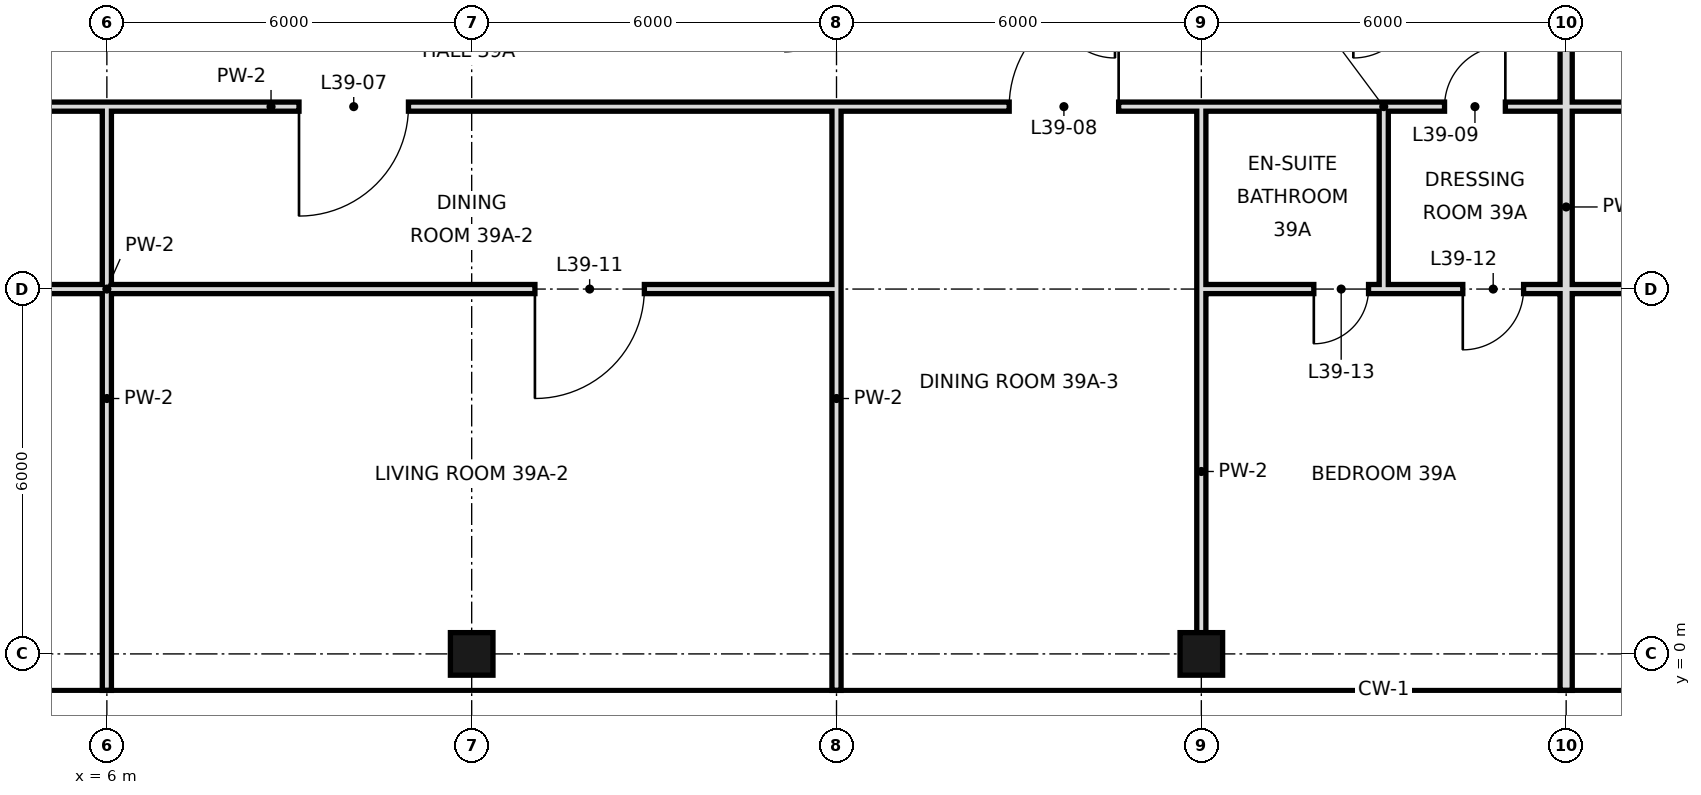
"""IFC4 building model, lengths in metres.
Left out: names, types, materials, properties, quantities, classifications, styles, units other than length and angle.
Written with IfcOpenShell. Run it as: python <this file> out.ifc"""

import sys

from ifc_helpers import new_model, si_unit, direction, frame, frame_2d, origin, origin_2d, place, context, subcontext, project, spatial, rectangle, hollow_rectangle, extrude, element, fill, save


model = new_model("IFC4")
c1 = context("Model", 3, precision=1e-05, world=origin(), true_north=direction((0.0, 1.0)))
c2 = subcontext(c1, "Body", "Model", "MODEL_VIEW")
j1 = project(units=[si_unit("LENGTHUNIT", "METRE"), si_unit("PLANEANGLEUNIT", "RADIAN")], contexts=[c1])
p1 = place(None, origin())
s1 = spatial("IfcSite", under=j1, at=p1, CompositionType="ELEMENT")
p2 = place(p1, origin())
s2 = spatial("IfcBuilding", under=s1, at=p2, CompositionType="ELEMENT")
p3 = place(p2, frame((0.0, 0.0, 170.8)))
s3 = spatial("IfcBuildingStorey", under=s2, at=p3, CompositionType="ELEMENT", Elevation=170.8)
for number, where, z_axis, x_axis in (
    (1, (12.0, 0.0, 0.0), (0.0, 0.0, 1.0), (1.0, 0.0, 0.0)),
    (2, (24.0, 0.0, 0.0), (0.0, 0.0, 1.0), (1.0, 0.0, 0.0)),
):
    element("IfcColumn", number, at=place(p3, frame(where, z_axis=z_axis, x_axis=x_axis)), inside=s3, PredefinedType="COLUMN", context=c2, shape_type="SweptSolid", body=[
        extrude(hollow_rectangle(XDim=0.7, YDim=0.7, WallThickness=0.036, at=origin_2d()), origin(), (0.0, 0.0, 1.0), 3.6),
    ])
p4 = place(p3, frame((18.0, -0.6, 0.0), z_axis=(0.0, 0.0, 1.0), x_axis=(0.0, 1.0, 0.0)))
e3 = element("IfcWall", 3, at=p4, inside=s3, PredefinedType="PARTITIONING", context=c2, shape_type="SweptSolid", body=[
    extrude(rectangle(XDim=9.6, YDim=0.15, at=frame_2d((4.8, 0.0))), origin(), (0.0, 0.0, 1.0), 2.72),
])
p5 = place(p3, frame((24.0, 0.0, 0.0), z_axis=(0.0, 0.0, 1.0), x_axis=(0.0, 1.0, 0.0)))
e4 = element("IfcWall", 4, at=p5, inside=s3, PredefinedType="PARTITIONING", context=c2, shape_type="SweptSolid", body=[
    extrude(rectangle(XDim=6.0, YDim=0.15, at=frame_2d((3.0, 0.0))), origin(), (0.0, 0.0, 1.0), 2.72),
])
p6 = place(p3, frame((24.0, 6.0, 0.0), z_axis=(0.0, 0.0, 1.0), x_axis=(0.0, 1.0, 0.0)))
e5 = element("IfcWall", 5, at=p6, inside=s3, PredefinedType="PARTITIONING", context=c2, shape_type="SweptSolid", body=[
    extrude(rectangle(XDim=3.0, YDim=0.15, at=frame_2d((1.5, 0.0))), origin(), (0.0, 0.0, 1.0), 2.72),
])
p7 = place(p3, frame((27.0, 6.0, 0.0), z_axis=(0.0, 0.0, 1.0), x_axis=(0.0, 1.0, 0.0)))
e6 = element("IfcWall", 6, at=p7, inside=s3, PredefinedType="PARTITIONING", context=c2, shape_type="SweptSolid", body=[
    extrude(rectangle(XDim=3.0, YDim=0.15, at=frame_2d((1.5, 0.0))), origin(), (0.0, 0.0, 1.0), 3.42),
])
p8 = place(p3, frame((30.0, -0.6, 0.0), z_axis=(0.0, 0.0, 1.0), x_axis=(0.0, 1.0, 0.0)))
e7 = element("IfcWall", 7, at=p8, inside=s3, PredefinedType="SOLIDWALL", context=c2, shape_type="SweptSolid", body=[
    extrude(rectangle(XDim=15.9, YDim=0.2, at=frame_2d((7.95, 0.0))), origin(), (0.0, 0.0, 1.0), 2.72),
])
p9 = place(p3, frame((6.0, -0.6, 0.0), z_axis=(0.0, 0.0, 1.0), x_axis=(0.0, 1.0, 0.0)))
e8 = element("IfcWall", 8, at=p9, inside=s3, PredefinedType="PARTITIONING", context=c2, shape_type="SweptSolid", body=[
    extrude(rectangle(XDim=9.6, YDim=0.15, at=frame_2d((4.8, 0.0))), origin(), (0.0, 0.0, 1.0), 2.72),
])
p10 = place(p3, frame((-6.0, 6.0, 0.0), z_axis=(0.0, 0.0, 1.0), x_axis=(1.0, 0.0, 0.0)))
e9 = element("IfcWall", 9, at=p10, inside=s3, PredefinedType="PARTITIONING", context=c2, shape_type="SweptSolid", body=[
    extrude(rectangle(XDim=24.0, YDim=0.15, at=frame_2d((12.0, 0.0))), origin(), (0.0, 0.0, 1.0), 2.97),
])
p11 = place(p10, frame((5.1, 0.0, 0.0)))
e10 = element("IfcOpeningElement", 10, at=p11, cuts=e9, PredefinedType="OPENING", context=c2, shape_type="SweptSolid", body=[
    extrude(rectangle(XDim=1.8, YDim=2.4, at=frame_2d((0.9, 1.2))), frame((0.0, 0.085, 0.0), z_axis=(0.0, -1.0, 0.0), x_axis=(1.0, 0.0, 0.0)), (0.0, 0.0, 1.0), 0.17),
])
p12 = place(p10, frame((19.04, 0.0, 0.0)))
e11 = element("IfcOpeningElement", 11, at=p12, cuts=e9, PredefinedType="OPENING", context=c2, shape_type="SweptSolid", body=[
    extrude(rectangle(XDim=1.8, YDim=2.4, at=frame_2d((0.9, 1.2))), frame((0.0, 0.085, 0.0), z_axis=(0.0, -1.0, 0.0), x_axis=(1.0, 0.0, 0.0)), (0.0, 0.0, 1.0), 0.17),
])
p13 = place(p3, frame((27.0, 6.0, 0.0), z_axis=(0.0, 0.0, 1.0), x_axis=(1.0, 0.0, 0.0)))
e12 = element("IfcWall", 12, at=p13, inside=s3, PredefinedType="PARTITIONING", context=c2, shape_type="SweptSolid", body=[
    extrude(rectangle(XDim=15.0, YDim=0.15, at=frame_2d((7.5, 0.0))), origin(), (0.0, 0.0, 1.0), 2.97),
])
p14 = place(p13, frame((1.3, 0.0, 0.0)))
e13 = element("IfcOpeningElement", 13, at=p14, cuts=e12, PredefinedType="OPENING", context=c2, shape_type="SweptSolid", body=[
    extrude(rectangle(XDim=1.0, YDim=2.4, at=frame_2d((0.5, 1.2))), frame((0.0, 0.085, 0.0), z_axis=(0.0, -1.0, 0.0), x_axis=(1.0, 0.0, 0.0)), (0.0, 0.0, 1.0), 0.17),
])
p15 = place(p13, frame((8.1, 0.0, 0.0)))
e14 = element("IfcOpeningElement", 14, at=p15, cuts=e12, PredefinedType="OPENING", context=c2, shape_type="SweptSolid", body=[
    extrude(rectangle(XDim=1.8, YDim=2.4, at=frame_2d((0.9, 1.2))), frame((0.0, 0.085, 0.0), z_axis=(0.0, -1.0, 0.0), x_axis=(1.0, 0.0, 0.0)), (0.0, 0.0, 1.0), 0.17),
])
p16 = place(p3, frame((24.0, 6.0, 0.0), z_axis=(0.0, 0.0, 1.0), x_axis=(1.0, 0.0, 0.0)))
e15 = element("IfcWall", 15, at=p16, inside=s3, PredefinedType="PARTITIONING", context=c2, shape_type="SweptSolid", body=[
    extrude(rectangle(XDim=3.0, YDim=0.15, at=frame_2d((1.5, 0.0))), origin(), (0.0, 0.0, 1.0), 2.97),
])
p17 = place(p16, frame((1.85, 0.0, 0.0)))
e16 = element("IfcOpeningElement", 16, at=p17, cuts=e15, PredefinedType="OPENING", context=c2, shape_type="SweptSolid", body=[
    extrude(rectangle(XDim=0.9, YDim=2.4, at=frame_2d((0.45, 1.2))), frame((0.0, 0.085, 0.0), z_axis=(0.0, -1.0, 0.0), x_axis=(1.0, 0.0, 0.0)), (0.0, 0.0, 1.0), 0.17),
])
p18 = place(p3, frame((-6.6, 9.0, 0.0), z_axis=(0.0, 0.0, 1.0), x_axis=(1.0, 0.0, 0.0)))
e17 = element("IfcWall", 17, at=p18, inside=s3, PredefinedType="PARTITIONING", context=c2, shape_type="SweptSolid", body=[
    extrude(rectangle(XDim=30.6, YDim=0.15, at=frame_2d((15.3, 0.0))), origin(), (0.0, 0.0, 1.0), 3.42),
])
p19 = place(p18, frame((7.64, 0.0, 0.0)))
e18 = element("IfcOpeningElement", 18, at=p19, cuts=e17, PredefinedType="OPENING", context=c2, shape_type="SweptSolid", body=[
    extrude(rectangle(XDim=1.8, YDim=2.4, at=frame_2d((0.9, 1.2))), frame((0.0, 0.085, 0.0), z_axis=(0.0, -1.0, 0.0), x_axis=(1.0, 0.0, 0.0)), (0.0, 0.0, 1.0), 0.17),
])
p20 = place(p18, frame((15.76, 0.0, 0.0)))
e19 = element("IfcOpeningElement", 19, at=p20, cuts=e17, PredefinedType="OPENING", context=c2, shape_type="SweptSolid", body=[
    extrude(rectangle(XDim=1.8, YDim=2.4, at=frame_2d((0.9, 1.2))), frame((0.0, 0.085, 0.0), z_axis=(0.0, -1.0, 0.0), x_axis=(1.0, 0.0, 0.0)), (0.0, 0.0, 1.0), 0.17),
])
p21 = place(p18, frame((27.44, 0.0, 0.0)))
e20 = element("IfcOpeningElement", 20, at=p21, cuts=e17, PredefinedType="OPENING", context=c2, shape_type="SweptSolid", body=[
    extrude(rectangle(XDim=1.8, YDim=2.4, at=frame_2d((0.9, 1.2))), frame((0.0, 0.085, 0.0), z_axis=(0.0, -1.0, 0.0), x_axis=(1.0, 0.0, 0.0)), (0.0, 0.0, 1.0), 0.17),
])
p22 = place(p3, frame((27.0, 9.0, 0.0), z_axis=(0.0, 0.0, 1.0), x_axis=(1.0, 0.0, 0.0)))
e21 = element("IfcWall", 21, at=p22, inside=s3, PredefinedType="PARTITIONING", context=c2, shape_type="SweptSolid", body=[
    extrude(rectangle(XDim=15.0, YDim=0.15, at=frame_2d((7.5, 0.0))), origin(), (0.0, 0.0, 1.0), 3.42),
])
p23 = place(p22, frame((1.0, 0.0, 0.0)))
e22 = element("IfcOpeningElement", 22, at=p23, cuts=e21, PredefinedType="OPENING", context=c2, shape_type="SweptSolid", body=[
    extrude(rectangle(XDim=1.0, YDim=2.4, at=frame_2d((0.5, 1.2))), frame((0.0, 0.085, 0.0), z_axis=(0.0, -1.0, 0.0), x_axis=(1.0, 0.0, 0.0)), (0.0, 0.0, 1.0), 0.17),
])
p24 = place(p22, frame((6.16, 0.0, 0.0)))
e23 = element("IfcOpeningElement", 23, at=p24, cuts=e21, PredefinedType="OPENING", context=c2, shape_type="SweptSolid", body=[
    extrude(rectangle(XDim=1.8, YDim=2.4, at=frame_2d((0.9, 1.2))), frame((0.0, 0.085, 0.0), z_axis=(0.0, -1.0, 0.0), x_axis=(1.0, 0.0, 0.0)), (0.0, 0.0, 1.0), 0.17),
])
p25 = place(p3, frame((24.0, 9.0, 0.0), z_axis=(0.0, 0.0, 1.0), x_axis=(1.0, 0.0, 0.0)))
e24 = element("IfcWall", 24, at=p25, inside=s3, PredefinedType="PARTITIONING", context=c2, shape_type="SweptSolid", body=[
    extrude(rectangle(XDim=3.0, YDim=0.15, at=frame_2d((1.5, 0.0))), origin(), (0.0, 0.0, 1.0), 3.42),
])
p26 = place(p20, frame((1.8, 0.0, 0.0), z_axis=(0.0, 0.0, 1.0), x_axis=(-1.0, 0.0, 0.0)))
e25 = element("IfcDoor", 25, at=p26, inside=s3, OperationType="SINGLE_SWING_RIGHT", PredefinedType="DOOR", context=c2, shape_type="SweptSolid", body=[
    extrude(rectangle(XDim=1.8, YDim=2.4, at=frame_2d((0.9, 1.2))), frame((0.0, 0.025, 0.0), z_axis=(0.0, -1.0, 0.0), x_axis=(1.0, 0.0, 0.0)), (0.0, 0.0, 1.0), 0.05),
])
fill(e19, e25)
p27 = place(p21, frame((1.8, 0.0, 0.0), z_axis=(0.0, 0.0, 1.0), x_axis=(-1.0, 0.0, 0.0)))
e26 = element("IfcDoor", 26, at=p27, inside=s3, OperationType="SINGLE_SWING_LEFT", PredefinedType="DOOR", context=c2, shape_type="SweptSolid", body=[
    extrude(rectangle(XDim=1.8, YDim=2.4, at=frame_2d((0.9, 1.2))), frame((0.0, 0.025, 0.0), z_axis=(0.0, -1.0, 0.0), x_axis=(1.0, 0.0, 0.0)), (0.0, 0.0, 1.0), 0.05),
])
fill(e20, e26)
p28 = place(p23, frame((1.0, 0.0, 0.0), z_axis=(0.0, 0.0, 1.0), x_axis=(-1.0, 0.0, 0.0)))
e27 = element("IfcDoor", 27, at=p28, inside=s3, OperationType="SINGLE_SWING_LEFT", PredefinedType="DOOR", context=c2, shape_type="SweptSolid", body=[
    extrude(rectangle(XDim=1.0, YDim=2.4, at=frame_2d((0.5, 1.2))), frame((0.0, 0.025, 0.0), z_axis=(0.0, -1.0, 0.0), x_axis=(1.0, 0.0, 0.0)), (0.0, 0.0, 1.0), 0.05),
])
fill(e22, e27)
p29 = place(p12, frame((1.8, 0.0, 0.0), z_axis=(0.0, 0.0, 1.0), x_axis=(-1.0, 0.0, 0.0)))
e28 = element("IfcDoor", 28, at=p29, inside=s3, OperationType="SINGLE_SWING_RIGHT", PredefinedType="DOOR", context=c2, shape_type="SweptSolid", body=[
    extrude(rectangle(XDim=1.8, YDim=2.4, at=frame_2d((0.9, 1.2))), frame((0.0, 0.025, 0.0), z_axis=(0.0, -1.0, 0.0), x_axis=(1.0, 0.0, 0.0)), (0.0, 0.0, 1.0), 0.05),
])
fill(e11, e28)
p30 = place(p14, frame((1.0, 0.0, 0.0), z_axis=(0.0, 0.0, 1.0), x_axis=(-1.0, 0.0, 0.0)))
e29 = element("IfcDoor", 29, at=p30, inside=s3, OperationType="SINGLE_SWING_RIGHT", PredefinedType="DOOR", context=c2, shape_type="SweptSolid", body=[
    extrude(rectangle(XDim=1.0, YDim=2.4, at=frame_2d((0.5, 1.2))), frame((0.0, 0.025, 0.0), z_axis=(0.0, -1.0, 0.0), x_axis=(1.0, 0.0, 0.0)), (0.0, 0.0, 1.0), 0.05),
])
fill(e13, e29)
p31 = place(p17, frame((0.9, 0.0, 0.0), z_axis=(0.0, 0.0, 1.0), x_axis=(-1.0, 0.0, 0.0)))
e30 = element("IfcDoor", 30, at=p31, inside=s3, OperationType="SINGLE_SWING_RIGHT", PredefinedType="DOOR", context=c2, shape_type="SweptSolid", body=[
    extrude(rectangle(XDim=0.9, YDim=2.4, at=frame_2d((0.45, 1.2))), frame((0.0, 0.025, 0.0), z_axis=(0.0, -1.0, 0.0), x_axis=(1.0, 0.0, 0.0)), (0.0, 0.0, 1.0), 0.05),
])
fill(e16, e30)
save(model, sys.argv[1])
